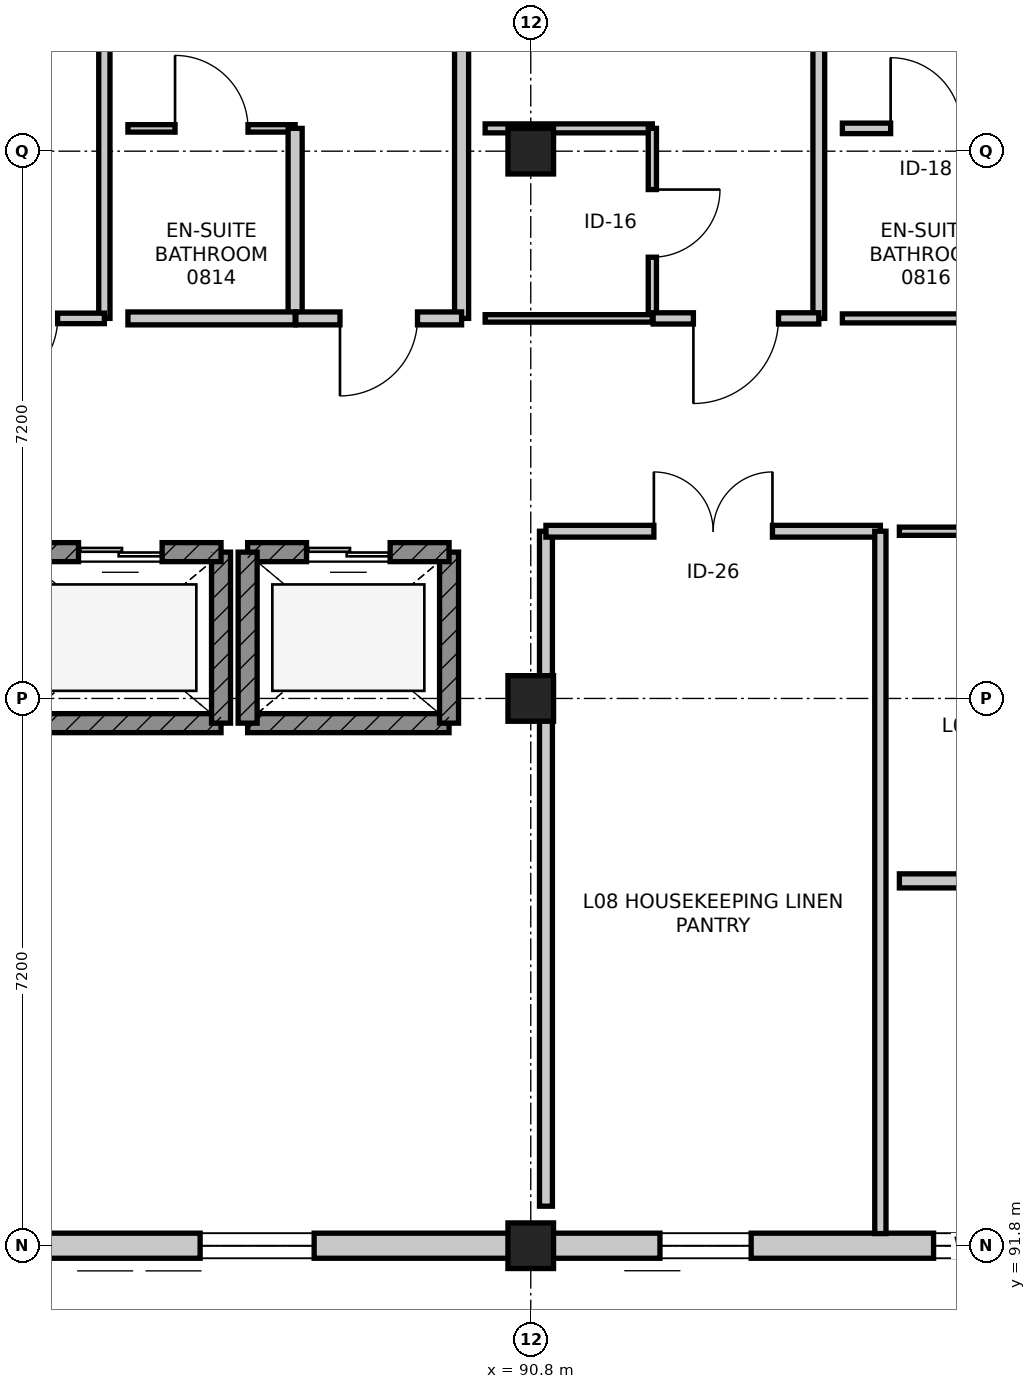
"""IFC4 building model, lengths in metres.
Left out: names, types, materials, properties, quantities, classifications, styles, units other than length and angle.
Written with IfcOpenShell. Run it as: python <this file> out.ifc"""

import sys

from ifc_helpers import new_model, si_unit, direction, frame, frame_2d, origin, origin_2d, place, context, subcontext, project, spatial, rectangle, extrude, element, fill, save


model = new_model("IFC4")
c1 = context("Model", 3, precision=1e-05, world=origin(), true_north=direction((0.0, 1.0)))
c2 = subcontext(c1, "Body", "Model", "MODEL_VIEW")
j1 = project(units=[si_unit("LENGTHUNIT", "METRE"), si_unit("PLANEANGLEUNIT", "RADIAN")], contexts=[c1])
p1 = place(None, origin())
s1 = spatial("IfcSite", under=j1, at=p1, CompositionType="ELEMENT")
p2 = place(p1, origin())
s2 = spatial("IfcBuilding", under=s1, at=p2, CompositionType="ELEMENT")
p3 = place(p2, frame((0.0, 0.0, 33.6)))
s3 = spatial("IfcBuildingStorey", under=s2, at=p3, CompositionType="ELEMENT", Elevation=33.6)
for number, where, z_axis, x_axis in (
    (1, (90.8, 91.8, 0.0), (0.0, 0.0, 1.0), (1.0, 0.0, 0.0)),
    (2, (90.8, 99.0, 0.0), (0.0, 0.0, 1.0), (1.0, 0.0, 0.0)),
    (3, (90.8, 106.2, 0.0), (0.0, 0.0, 1.0), (1.0, 0.0, 0.0)),
):
    element("IfcColumn", number, at=place(p3, frame(where, z_axis=z_axis, x_axis=x_axis)), inside=s3, PredefinedType="COLUMN", context=c2, shape_type="SweptSolid", body=[
        extrude(rectangle(XDim=0.6, YDim=0.6, at=origin_2d()), origin(), (0.0, 0.0, 1.0), 3.6),
    ])
p4 = place(p3, frame((98.0, 91.8, 0.0), z_axis=(0.0, 0.0, 1.0), x_axis=(-1.0, 0.0, 0.0)))
e4 = element("IfcWall", 4, at=p4, inside=s3, PredefinedType="STANDARD", context=c2, shape_type="SweptSolid", body=[
    extrude(rectangle(XDim=7.2, YDim=0.33, at=frame_2d((3.6, 0.0))), origin(), (0.0, 0.0, 1.0), 2.745),
])
p5 = place(p4, frame((0.7, 0.0, 0.75)))
e5 = element("IfcOpeningElement", 5, at=p5, cuts=e4, PredefinedType="OPENING", context=c2, shape_type="SweptSolid", body=[
    extrude(rectangle(XDim=1.2, YDim=1.5, at=frame_2d((0.6, 0.75))), frame((0.0, 0.175, 0.0), z_axis=(0.0, -1.0, 0.0), x_axis=(1.0, 0.0, 0.0)), (0.0, 0.0, 1.0), 0.35),
])
p6 = place(p4, frame((4.3, 0.0, 0.75)))
e6 = element("IfcOpeningElement", 6, at=p6, cuts=e4, PredefinedType="OPENING", context=c2, shape_type="SweptSolid", body=[
    extrude(rectangle(XDim=1.2, YDim=1.5, at=frame_2d((0.6, 0.75))), frame((0.0, 0.175, 0.0), z_axis=(0.0, -1.0, 0.0), x_axis=(1.0, 0.0, 0.0)), (0.0, 0.0, 1.0), 0.35),
])
p7 = place(p3, frame((90.8, 91.8, 0.0), z_axis=(0.0, 0.0, 1.0), x_axis=(-1.0, 0.0, 0.0)))
e7 = element("IfcWall", 7, at=p7, inside=s3, PredefinedType="STANDARD", context=c2, shape_type="SweptSolid", body=[
    extrude(rectangle(XDim=7.2, YDim=0.33, at=frame_2d((3.6, 0.0))), origin(), (0.0, 0.0, 1.0), 2.745),
])
p8 = place(p7, frame((2.85, 0.0, 0.75)))
e8 = element("IfcOpeningElement", 8, at=p8, cuts=e7, PredefinedType="OPENING", context=c2, shape_type="SweptSolid", body=[
    extrude(rectangle(XDim=1.5, YDim=1.5, at=frame_2d((0.75, 0.75))), frame((0.0, 0.175, 0.0), z_axis=(0.0, -1.0, 0.0), x_axis=(1.0, 0.0, 0.0)), (0.0, 0.0, 1.0), 0.35),
])
p9 = place(p3, frame((84.075, 98.675, 0.0), z_axis=(0.0, 0.0, 1.0), x_axis=(1.0, 0.0, 0.0)))
e9 = element("IfcWall", 9, at=p9, inside=s3, PredefinedType="SHEAR", context=c2, shape_type="SweptSolid", body=[
    extrude(rectangle(XDim=2.65, YDim=0.25, at=frame_2d((1.325, 0.0))), origin(), (0.0, 0.0, 1.0), 3.36),
])
p10 = place(p3, frame((86.725, 98.675, 0.0), z_axis=(0.0, 0.0, 1.0), x_axis=(0.0, 1.0, 0.0)))
e10 = element("IfcWall", 10, at=p10, inside=s3, PredefinedType="SHEAR", context=c2, shape_type="SweptSolid", body=[
    extrude(rectangle(XDim=2.25, YDim=0.25, at=frame_2d((1.125, 0.0))), origin(), (0.0, 0.0, 1.0), 3.36),
])
p11 = place(p3, frame((86.725, 100.925, 0.0), z_axis=(0.0, 0.0, 1.0), x_axis=(-1.0, 0.0, 0.0)))
e11 = element("IfcWall", 11, at=p11, inside=s3, PredefinedType="SHEAR", context=c2, shape_type="SweptSolid", body=[
    extrude(rectangle(XDim=2.65, YDim=0.25, at=frame_2d((1.325, 0.0))), origin(), (0.0, 0.0, 1.0), 3.36),
])
p12 = place(p11, frame((0.775, 0.0, 0.0)))
e12 = element("IfcOpeningElement", 12, at=p12, cuts=e11, PredefinedType="OPENING", context=c2, shape_type="SweptSolid", body=[
    extrude(rectangle(XDim=1.1, YDim=2.15, at=frame_2d((0.55, 1.075))), frame((0.0, 0.135, 0.0), z_axis=(0.0, -1.0, 0.0), x_axis=(1.0, 0.0, 0.0)), (0.0, 0.0, 1.0), 0.27),
])
p13 = place(p3, frame((87.075, 98.675, 0.0), z_axis=(0.0, 0.0, 1.0), x_axis=(1.0, 0.0, 0.0)))
e13 = element("IfcWall", 13, at=p13, inside=s3, PredefinedType="SHEAR", context=c2, shape_type="SweptSolid", body=[
    extrude(rectangle(XDim=2.65, YDim=0.25, at=frame_2d((1.325, 0.0))), origin(), (0.0, 0.0, 1.0), 3.36),
])
p14 = place(p3, frame((89.725, 98.675, 0.0), z_axis=(0.0, 0.0, 1.0), x_axis=(0.0, 1.0, 0.0)))
e14 = element("IfcWall", 14, at=p14, inside=s3, PredefinedType="SHEAR", context=c2, shape_type="SweptSolid", body=[
    extrude(rectangle(XDim=2.25, YDim=0.25, at=frame_2d((1.125, 0.0))), origin(), (0.0, 0.0, 1.0), 3.36),
])
p15 = place(p3, frame((89.725, 100.925, 0.0), z_axis=(0.0, 0.0, 1.0), x_axis=(-1.0, 0.0, 0.0)))
e15 = element("IfcWall", 15, at=p15, inside=s3, PredefinedType="SHEAR", context=c2, shape_type="SweptSolid", body=[
    extrude(rectangle(XDim=2.65, YDim=0.25, at=frame_2d((1.325, 0.0))), origin(), (0.0, 0.0, 1.0), 3.36),
])
p16 = place(p15, frame((0.775, 0.0, 0.0)))
e16 = element("IfcOpeningElement", 16, at=p16, cuts=e15, PredefinedType="OPENING", context=c2, shape_type="SweptSolid", body=[
    extrude(rectangle(XDim=1.1, YDim=2.15, at=frame_2d((0.55, 1.075))), frame((0.0, 0.135, 0.0), z_axis=(0.0, -1.0, 0.0), x_axis=(1.0, 0.0, 0.0)), (0.0, 0.0, 1.0), 0.27),
])
p17 = place(p3, frame((87.075, 100.925, 0.0), z_axis=(0.0, 0.0, 1.0), x_axis=(0.0, -1.0, 0.0)))
e17 = element("IfcWall", 17, at=p17, inside=s3, PredefinedType="SHEAR", context=c2, shape_type="SweptSolid", body=[
    extrude(rectangle(XDim=2.25, YDim=0.25, at=frame_2d((1.125, 0.0))), origin(), (0.0, 0.0, 1.0), 3.36),
])
p18 = place(p3, frame((91.0, 92.32, 0.0), z_axis=(0.0, 0.0, 1.0), x_axis=(0.0, 1.0, 0.0)))
e18 = element("IfcWall", 18, at=p18, inside=s3, PredefinedType="PARTITIONING", context=c2, shape_type="SweptSolid", body=[
    extrude(rectangle(XDim=8.88, YDim=0.17, at=frame_2d((4.44, 0.0))), origin(), (0.0, 0.0, 1.0), 2.695),
])
p19 = place(p3, frame((91.0, 101.2, 0.0), z_axis=(0.0, 0.0, 1.0), x_axis=(1.0, 0.0, 0.0)))
e19 = element("IfcWall", 19, at=p19, inside=s3, PredefinedType="PARTITIONING", context=c2, shape_type="SweptSolid", body=[
    extrude(rectangle(XDim=4.4, YDim=0.155, at=frame_2d((2.2, 0.0))), origin(), (0.0, 0.0, 1.0), 2.695),
])
p20 = place(p19, frame((1.42, 0.0, 0.0)))
e20 = element("IfcOpeningElement", 20, at=p20, cuts=e19, PredefinedType="OPENING", context=c2, shape_type="SweptSolid", body=[
    extrude(rectangle(XDim=1.56, YDim=2.26, at=frame_2d((0.78, 1.13))), frame((0.0, 0.087, 0.0), z_axis=(0.0, -1.0, 0.0), x_axis=(1.0, 0.0, 0.0)), (0.0, 0.0, 1.0), 0.175),
])
p21 = place(p3, frame((95.4, 101.2, 0.0), z_axis=(0.0, 0.0, 1.0), x_axis=(0.0, -1.0, 0.0)))
e21 = element("IfcWall", 21, at=p21, inside=s3, PredefinedType="PARTITIONING", context=c2, shape_type="SweptSolid", body=[
    extrude(rectangle(XDim=9.24, YDim=0.148, at=frame_2d((4.62, 0.0))), origin(), (0.0, 0.0, 1.0), 2.745),
])
p22 = place(p3, frame((95.65, 101.2, 0.0), z_axis=(0.0, 0.0, 1.0), x_axis=(1.0, 0.0, 0.0)))
e22 = element("IfcWall", 22, at=p22, inside=s3, PredefinedType="PARTITIONING", context=c2, shape_type="SweptSolid", body=[
    extrude(rectangle(XDim=3.25, YDim=0.108, at=frame_2d((1.625, 0.0))), origin(), (0.0, 0.0, 1.0), 2.695),
])
p23 = place(p22, frame((0.875, 0.0, 0.0)))
e23 = element("IfcOpeningElement", 23, at=p23, cuts=e22, PredefinedType="OPENING", context=c2, shape_type="SweptSolid", body=[
    extrude(rectangle(XDim=1.5, YDim=2.2, at=frame_2d((0.75, 1.1))), frame((0.0, 0.064, 0.0), z_axis=(0.0, -1.0, 0.0), x_axis=(1.0, 0.0, 0.0)), (0.0, 0.0, 1.0), 0.128),
])
p24 = place(p3, frame((98.9, 96.6, 0.0), z_axis=(0.0, 0.0, 1.0), x_axis=(-1.0, 0.0, 0.0)))
e24 = element("IfcWall", 24, at=p24, inside=s3, PredefinedType="PARTITIONING", context=c2, shape_type="SweptSolid", body=[
    extrude(rectangle(XDim=3.25, YDim=0.185, at=frame_2d((1.625, 0.0))), origin(), (0.0, 0.0, 1.0), 2.695),
])
p25 = place(p3, frame((85.19, 115.929, 0.0), z_axis=(0.0, 0.0, 1.0), x_axis=(0.0, -1.0, 0.0)))
e25 = element("IfcWall", 25, at=p25, inside=s3, PredefinedType="PARTITIONING", context=c2, shape_type="SweptSolid", body=[
    extrude(rectangle(XDim=11.929, YDim=0.148, at=frame_2d((5.964, 0.0))), origin(), (0.0, 0.0, 1.0), 2.745),
])
p26 = place(p3, frame((85.19, 104.0, 0.0), z_axis=(0.0, 0.0, 1.0), x_axis=(-1.0, 0.0, 0.0)))
e26 = element("IfcWall", 26, at=p26, inside=s3, PredefinedType="PARTITIONING", context=c2, shape_type="SweptSolid", body=[
    extrude(rectangle(XDim=2.18, YDim=0.138, at=frame_2d((1.09, 0.0))), origin(), (0.0, 0.0, 1.0), 2.695),
])
p27 = place(p26, frame((0.615, 0.0, 0.0)))
e27 = element("IfcOpeningElement", 27, at=p27, cuts=e26, PredefinedType="OPENING", context=c2, shape_type="SweptSolid", body=[
    extrude(rectangle(XDim=0.95, YDim=2.1, at=frame_2d((0.475, 1.05))), frame((0.0, 0.079, 0.0), z_axis=(0.0, -1.0, 0.0), x_axis=(1.0, 0.0, 0.0)), (0.0, 0.0, 1.0), 0.158),
])
p28 = place(p3, frame((85.5, 106.5, 0.0), z_axis=(0.0, 0.0, 1.0), x_axis=(1.0, 0.0, 0.0)))
e28 = element("IfcWall", 28, at=p28, inside=s3, PredefinedType="PARTITIONING", context=c2, shape_type="SweptSolid", body=[
    extrude(rectangle(XDim=2.2, YDim=0.098, at=frame_2d((1.1, 0.0))), origin(), (0.0, 0.0, 1.0), 3.36),
])
p29 = place(p28, frame((0.62, 0.0, 0.0)))
e29 = element("IfcOpeningElement", 29, at=p29, cuts=e28, PredefinedType="OPENING", context=c2, shape_type="SweptSolid", body=[
    extrude(rectangle(XDim=0.96, YDim=2.14, at=frame_2d((0.48, 1.07))), frame((0.0, 0.059, 0.0), z_axis=(0.0, -1.0, 0.0), x_axis=(1.0, 0.0, 0.0)), (0.0, 0.0, 1.0), 0.118),
])
p30 = place(p3, frame((87.7, 106.5, 0.0), z_axis=(0.0, 0.0, 1.0), x_axis=(0.0, -1.0, 0.0)))
e30 = element("IfcWall", 30, at=p30, inside=s3, PredefinedType="PARTITIONING", context=c2, shape_type="SweptSolid", body=[
    extrude(rectangle(XDim=2.5, YDim=0.185, at=frame_2d((1.25, 0.0))), origin(), (0.0, 0.0, 1.0), 2.745),
])
p31 = place(p3, frame((87.7, 104.0, 0.0), z_axis=(0.0, 0.0, 1.0), x_axis=(-1.0, 0.0, 0.0)))
e31 = element("IfcWall", 31, at=p31, inside=s3, PredefinedType="PARTITIONING", context=c2, shape_type="SweptSolid", body=[
    extrude(rectangle(XDim=2.2, YDim=0.17, at=frame_2d((1.1, 0.0))), origin(), (0.0, 0.0, 1.0), 3.36),
])
p32 = place(p3, frame((89.89, 116.059, 0.0), z_axis=(0.0, 0.0, 1.0), x_axis=(0.0, -1.0, 0.0)))
e32 = element("IfcWall", 32, at=p32, inside=s3, PredefinedType="PARTITIONING", context=c2, shape_type="SweptSolid", body=[
    extrude(rectangle(XDim=12.059, YDim=0.185, at=frame_2d((6.03, 0.0))), origin(), (0.0, 0.0, 1.0), 2.745),
])
p33 = place(p3, frame((89.89, 104.0, 0.0), z_axis=(0.0, 0.0, 1.0), x_axis=(-1.0, 0.0, 0.0)))
e33 = element("IfcWall", 33, at=p33, inside=s3, PredefinedType="PARTITIONING", context=c2, shape_type="SweptSolid", body=[
    extrude(rectangle(XDim=2.18, YDim=0.17, at=frame_2d((1.09, 0.0))), origin(), (0.0, 0.0, 1.0), 3.36),
])
p34 = place(p33, frame((0.58, 0.0, 0.0)))
e34 = element("IfcOpeningElement", 34, at=p34, cuts=e33, PredefinedType="OPENING", context=c2, shape_type="SweptSolid", body=[
    extrude(rectangle(XDim=1.02, YDim=2.15, at=frame_2d((0.51, 1.075))), frame((0.0, 0.095, 0.0), z_axis=(0.0, -1.0, 0.0), x_axis=(1.0, 0.0, 0.0)), (0.0, 0.0, 1.0), 0.19),
])
p35 = place(p3, frame((90.2, 106.5, 0.0), z_axis=(0.0, 0.0, 1.0), x_axis=(1.0, 0.0, 0.0)))
e35 = element("IfcWall", 35, at=p35, inside=s3, PredefinedType="PARTITIONING", context=c2, shape_type="SweptSolid", body=[
    extrude(rectangle(XDim=2.2, YDim=0.118, at=frame_2d((1.1, 0.0))), origin(), (0.0, 0.0, 1.0), 2.695),
])
p36 = place(p3, frame((92.4, 106.5, 0.0), z_axis=(0.0, 0.0, 1.0), x_axis=(0.0, -1.0, 0.0)))
e36 = element("IfcWall", 36, at=p36, inside=s3, PredefinedType="PARTITIONING", context=c2, shape_type="SweptSolid", body=[
    extrude(rectangle(XDim=2.5, YDim=0.108, at=frame_2d((1.25, 0.0))), origin(), (0.0, 0.0, 1.0), 2.745),
])
p37 = place(p36, frame((0.805, 0.0, 0.0)))
e37 = element("IfcOpeningElement", 37, at=p37, cuts=e36, PredefinedType="OPENING", context=c2, shape_type="SweptSolid", body=[
    extrude(rectangle(XDim=0.89, YDim=2.09, at=frame_2d((0.445, 1.045))), frame((0.0, 0.064, 0.0), z_axis=(0.0, -1.0, 0.0), x_axis=(1.0, 0.0, 0.0)), (0.0, 0.0, 1.0), 0.128),
])
p38 = place(p3, frame((92.4, 104.0, 0.0), z_axis=(0.0, 0.0, 1.0), x_axis=(-1.0, 0.0, 0.0)))
e38 = element("IfcWall", 38, at=p38, inside=s3, PredefinedType="PARTITIONING", context=c2, shape_type="SweptSolid", body=[
    extrude(rectangle(XDim=2.2, YDim=0.098, at=frame_2d((1.1, 0.0))), origin(), (0.0, 0.0, 1.0), 2.695),
])
p39 = place(p3, frame((94.59, 116.132, 0.0), z_axis=(0.0, 0.0, 1.0), x_axis=(0.0, -1.0, 0.0)))
e39 = element("IfcWall", 39, at=p39, inside=s3, PredefinedType="PARTITIONING", context=c2, shape_type="SweptSolid", body=[
    extrude(rectangle(XDim=12.132, YDim=0.155, at=frame_2d((6.066, 0.0))), origin(), (0.0, 0.0, 1.0), 2.745),
])
p40 = place(p3, frame((94.59, 104.0, 0.0), z_axis=(0.0, 0.0, 1.0), x_axis=(-1.0, 0.0, 0.0)))
e40 = element("IfcWall", 40, at=p40, inside=s3, PredefinedType="PARTITIONING", context=c2, shape_type="SweptSolid", body=[
    extrude(rectangle(XDim=2.18, YDim=0.148, at=frame_2d((1.09, 0.0))), origin(), (0.0, 0.0, 1.0), 3.36),
])
p41 = place(p40, frame((0.53, 0.0, 0.0)))
e41 = element("IfcOpeningElement", 41, at=p41, cuts=e40, PredefinedType="OPENING", context=c2, shape_type="SweptSolid", body=[
    extrude(rectangle(XDim=1.12, YDim=2.2, at=frame_2d((0.56, 1.1))), frame((0.0, 0.084, 0.0), z_axis=(0.0, -1.0, 0.0), x_axis=(1.0, 0.0, 0.0)), (0.0, 0.0, 1.0), 0.168),
])
p42 = place(p3, frame((94.9, 106.5, 0.0), z_axis=(0.0, 0.0, 1.0), x_axis=(1.0, 0.0, 0.0)))
e42 = element("IfcWall", 42, at=p42, inside=s3, PredefinedType="PARTITIONING", context=c2, shape_type="SweptSolid", body=[
    extrude(rectangle(XDim=2.2, YDim=0.138, at=frame_2d((1.1, 0.0))), origin(), (0.0, 0.0, 1.0), 3.36),
])
p43 = place(p42, frame((0.635, 0.0, 0.0)))
e43 = element("IfcOpeningElement", 43, at=p43, cuts=e42, PredefinedType="OPENING", context=c2, shape_type="SweptSolid", body=[
    extrude(rectangle(XDim=0.93, YDim=2.13, at=frame_2d((0.465, 1.065))), frame((0.0, 0.079, 0.0), z_axis=(0.0, -1.0, 0.0), x_axis=(1.0, 0.0, 0.0)), (0.0, 0.0, 1.0), 0.158),
])
p44 = place(p3, frame((97.1, 104.0, 0.0), z_axis=(0.0, 0.0, 1.0), x_axis=(-1.0, 0.0, 0.0)))
e44 = element("IfcWall", 44, at=p44, inside=s3, PredefinedType="PARTITIONING", context=c2, shape_type="SweptSolid", body=[
    extrude(rectangle(XDim=2.2, YDim=0.118, at=frame_2d((1.1, 0.0))), origin(), (0.0, 0.0, 1.0), 3.36),
])
p45 = place(p5, origin())
e45 = element("IfcWindow", 45, at=p45, inside=s3, PartitioningType="SINGLE_PANEL", PredefinedType="WINDOW", context=c2, shape_type="SweptSolid", body=[
    extrude(rectangle(XDim=1.2, YDim=1.5, at=frame_2d((0.6, 0.75))), frame((0.0, 0.03, 0.0), z_axis=(0.0, -1.0, 0.0), x_axis=(1.0, 0.0, 0.0)), (0.0, 0.0, 1.0), 0.06),
])
fill(e5, e45)
p46 = place(p8, origin())
e46 = element("IfcWindow", 46, at=p46, inside=s3, PartitioningType="SINGLE_PANEL", PredefinedType="WINDOW", context=c2, shape_type="SweptSolid", body=[
    extrude(rectangle(XDim=1.5, YDim=1.5, at=frame_2d((0.75, 0.75))), frame((0.0, 0.03, 0.0), z_axis=(0.0, -1.0, 0.0), x_axis=(1.0, 0.0, 0.0)), (0.0, 0.0, 1.0), 0.06),
])
fill(e8, e46)
p47 = place(p12, origin())
e47 = element("IfcDoor", 47, at=p47, inside=s3, OperationType="DOUBLE_DOOR_SLIDING", PredefinedType="DOOR", context=c2, shape_type="SweptSolid", body=[
    extrude(rectangle(XDim=1.1, YDim=2.15, at=frame_2d((0.55, 1.075))), frame((0.0, 0.025, 0.0), z_axis=(0.0, -1.0, 0.0), x_axis=(1.0, 0.0, 0.0)), (0.0, 0.0, 1.0), 0.05),
])
fill(e12, e47)
p48 = place(p16, origin())
e48 = element("IfcDoor", 48, at=p48, inside=s3, OperationType="DOUBLE_DOOR_SLIDING", PredefinedType="DOOR", context=c2, shape_type="SweptSolid", body=[
    extrude(rectangle(XDim=1.1, YDim=2.15, at=frame_2d((0.55, 1.075))), frame((0.0, 0.025, 0.0), z_axis=(0.0, -1.0, 0.0), x_axis=(1.0, 0.0, 0.0)), (0.0, 0.0, 1.0), 0.05),
])
fill(e16, e48)
p49 = place(p20, origin())
e49 = element("IfcDoor", 49, at=p49, inside=s3, OperationType="DOUBLE_DOOR_SINGLE_SWING", PredefinedType="DOOR", context=c2, shape_type="SweptSolid", body=[
    extrude(rectangle(XDim=1.56, YDim=2.26, at=frame_2d((0.78, 1.13))), frame((0.0, 0.025, 0.0), z_axis=(0.0, -1.0, 0.0), x_axis=(1.0, 0.0, 0.0)), (0.0, 0.0, 1.0), 0.05),
])
fill(e20, e49)
p50 = place(p27, origin())
e50 = element("IfcDoor", 50, at=p50, inside=s3, OperationType="SINGLE_SWING_RIGHT", PredefinedType="DOOR", context=c2, shape_type="SweptSolid", body=[
    extrude(rectangle(XDim=0.95, YDim=2.1, at=frame_2d((0.475, 1.05))), frame((0.0, 0.025, 0.0), z_axis=(0.0, -1.0, 0.0), x_axis=(1.0, 0.0, 0.0)), (0.0, 0.0, 1.0), 0.05),
])
fill(e27, e50)
p51 = place(p29, origin())
e51 = element("IfcDoor", 51, at=p51, inside=s3, OperationType="SINGLE_SWING_LEFT", PredefinedType="DOOR", context=c2, shape_type="SweptSolid", body=[
    extrude(rectangle(XDim=0.96, YDim=2.14, at=frame_2d((0.48, 1.07))), frame((0.0, 0.025, 0.0), z_axis=(0.0, -1.0, 0.0), x_axis=(1.0, 0.0, 0.0)), (0.0, 0.0, 1.0), 0.05),
])
fill(e29, e51)
p52 = place(p34, origin())
e52 = element("IfcDoor", 52, at=p52, inside=s3, OperationType="SINGLE_SWING_RIGHT", PredefinedType="DOOR", context=c2, shape_type="SweptSolid", body=[
    extrude(rectangle(XDim=1.02, YDim=2.15, at=frame_2d((0.51, 1.075))), frame((0.0, 0.025, 0.0), z_axis=(0.0, -1.0, 0.0), x_axis=(1.0, 0.0, 0.0)), (0.0, 0.0, 1.0), 0.05),
])
fill(e34, e52)
p53 = place(p37, origin())
e53 = element("IfcDoor", 53, at=p53, inside=s3, OperationType="SINGLE_SWING_LEFT", PredefinedType="DOOR", context=c2, shape_type="SweptSolid", body=[
    extrude(rectangle(XDim=0.89, YDim=2.09, at=frame_2d((0.445, 1.045))), frame((0.0, 0.025, 0.0), z_axis=(0.0, -1.0, 0.0), x_axis=(1.0, 0.0, 0.0)), (0.0, 0.0, 1.0), 0.05),
])
fill(e37, e53)
p54 = place(p41, origin())
e54 = element("IfcDoor", 54, at=p54, inside=s3, OperationType="SINGLE_SWING_RIGHT", PredefinedType="DOOR", context=c2, shape_type="SweptSolid", body=[
    extrude(rectangle(XDim=1.12, YDim=2.2, at=frame_2d((0.56, 1.1))), frame((0.0, 0.025, 0.0), z_axis=(0.0, -1.0, 0.0), x_axis=(1.0, 0.0, 0.0)), (0.0, 0.0, 1.0), 0.05),
])
fill(e41, e54)
p55 = place(p43, origin())
e55 = element("IfcDoor", 55, at=p55, inside=s3, OperationType="SINGLE_SWING_LEFT", PredefinedType="DOOR", context=c2, shape_type="SweptSolid", body=[
    extrude(rectangle(XDim=0.93, YDim=2.13, at=frame_2d((0.465, 1.065))), frame((0.0, 0.025, 0.0), z_axis=(0.0, -1.0, 0.0), x_axis=(1.0, 0.0, 0.0)), (0.0, 0.0, 1.0), 0.05),
])
fill(e43, e55)
p56 = place(p6, origin())
e56 = element("IfcWindow", 56, at=p56, inside=s3, PartitioningType="SINGLE_PANEL", PredefinedType="WINDOW", context=c2, shape_type="SweptSolid", body=[
    extrude(rectangle(XDim=1.2, YDim=1.5, at=frame_2d((0.6, 0.75))), frame((0.0, 0.03, 0.0), z_axis=(0.0, -1.0, 0.0), x_axis=(1.0, 0.0, 0.0)), (0.0, 0.0, 1.0), 0.06),
])
fill(e6, e56)
save(model, sys.argv[1])
